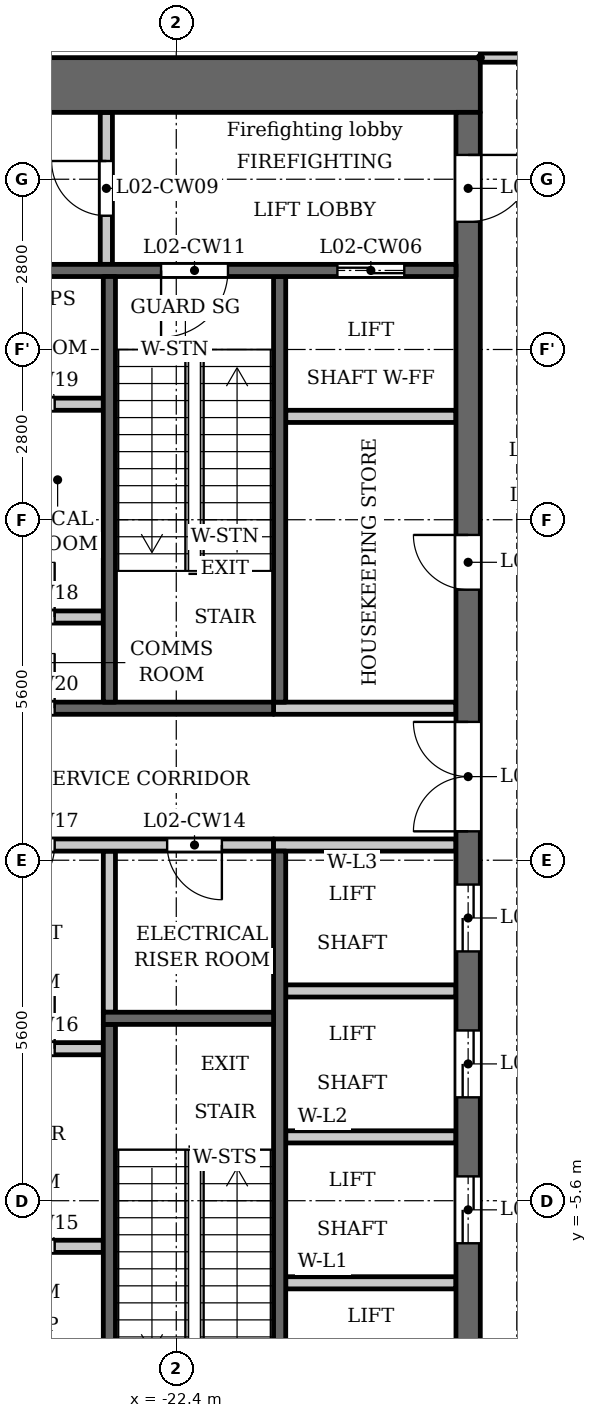
"""IFC4 building model, lengths in metres.
Left out: names, types, materials, properties, quantities, classifications, styles, units other than length and angle.
Written with IfcOpenShell. Run it as: python <this file> out.ifc"""

import sys

from ifc_helpers import new_model, si_unit, direction, frame, frame_2d, origin, place, context, subcontext, project, spatial, rectangle, extrude, element, fill, save


model = new_model("IFC4")
c1 = context("Model", 3, precision=1e-05, world=origin(), true_north=direction((0.0, 1.0)))
c2 = subcontext(c1, "Body", "Model", "MODEL_VIEW")
j1 = project(units=[si_unit("LENGTHUNIT", "METRE"), si_unit("PLANEANGLEUNIT", "RADIAN")], contexts=[c1])
p1 = place(None, origin())
s1 = spatial("IfcSite", under=j1, at=p1, CompositionType="ELEMENT")
p2 = place(p1, origin())
s2 = spatial("IfcBuilding", under=s1, at=p2, CompositionType="ELEMENT")
p3 = place(p2, frame((0.0, 0.0, 11.3)))
s3 = spatial("IfcBuildingStorey", under=s2, at=p3, CompositionType="ELEMENT", Elevation=11.3)
p4 = place(p3, frame((-23.5, -2.5, 0.0), z_axis=(0.0, 0.0, 1.0), x_axis=(0.0, 1.0, 0.0)))
e1 = element("IfcWall", 1, at=p4, inside=s3, PredefinedType="PARTITIONING", context=c2, shape_type="SweptSolid", body=[
    extrude(rectangle(XDim=2.65, YDim=0.2, at=frame_2d((1.325, 0.0))), origin(), (0.0, 0.0, 1.0), 4.45),
])
p5 = place(p3, frame((-20.7, 2.6, 0.0), z_axis=(0.0, 0.0, 1.0), x_axis=(0.0, 1.0, 0.0)))
e2 = element("IfcWall", 2, at=p5, inside=s3, PredefinedType="SHEAR", context=c2, shape_type="SweptSolid", body=[
    extrude(rectangle(XDim=7.0, YDim=0.2, at=frame_2d((3.5, 0.0))), origin(), (0.0, 0.0, 1.0), 4.45),
])
p6 = place(p3, frame((-20.7, -9.6, 0.0), z_axis=(0.0, 0.0, 1.0), x_axis=(0.0, 1.0, 0.0)))
e3 = element("IfcWall", 3, at=p6, inside=s3, PredefinedType="SHEAR", context=c2, shape_type="SweptSolid", body=[
    extrude(rectangle(XDim=9.75, YDim=0.2, at=frame_2d((4.875, 0.0))), origin(), (0.0, 0.0, 1.0), 4.45),
])
p7 = place(p3, frame((-20.8, 2.5, 0.0), z_axis=(0.0, 0.0, 1.0), x_axis=(-1.0, 0.0, 0.0)))
e4 = element("IfcWall", 4, at=p7, inside=s3, PredefinedType="SHEAR", context=c2, shape_type="SweptSolid", body=[
    extrude(rectangle(XDim=5.3, YDim=0.2, at=frame_2d((2.65, 0.0))), origin(), (0.0, 0.0, 1.0), 4.45),
])
p8 = place(p7, frame((3.6, 0.0, 0.0)))
e5 = element("IfcOpeningElement", 5, at=p8, cuts=e4, PredefinedType="OPENING", context=c2, shape_type="SweptSolid", body=[
    extrude(rectangle(XDim=0.9, YDim=2.1, at=frame_2d((0.45, 1.05))), frame((0.0, 0.11, 0.0), z_axis=(0.0, -1.0, 0.0), x_axis=(1.0, 0.0, 0.0)), (0.0, 0.0, 1.0), 0.22),
])
p9 = place(p3, frame((-20.8, 0.25, 0.0), z_axis=(0.0, 0.0, 1.0), x_axis=(-1.0, 0.0, 0.0)))
e6 = element("IfcWall", 6, at=p9, inside=s3, PredefinedType="PARTITIONING", context=c2, shape_type="SweptSolid", body=[
    extrude(rectangle(XDim=5.3, YDim=0.2, at=frame_2d((2.65, 0.0))), origin(), (0.0, 0.0, 1.0), 4.45),
])
p10 = place(p9, frame((0.85, 0.0, 0.0)))
e7 = element("IfcOpeningElement", 7, at=p10, cuts=e6, PredefinedType="OPENING", context=c2, shape_type="SweptSolid", body=[
    extrude(rectangle(XDim=0.9, YDim=2.1, at=frame_2d((0.45, 1.05))), frame((0.0, 0.11, 0.0), z_axis=(0.0, -1.0, 0.0), x_axis=(1.0, 0.0, 0.0)), (0.0, 0.0, 1.0), 0.22),
])
p11 = place(p9, frame((3.6, 0.0, 0.0)))
e8 = element("IfcOpeningElement", 8, at=p11, cuts=e6, PredefinedType="OPENING", context=c2, shape_type="SweptSolid", body=[
    extrude(rectangle(XDim=0.9, YDim=2.1, at=frame_2d((0.45, 1.05))), frame((0.0, 0.11, 0.0), z_axis=(0.0, -1.0, 0.0), x_axis=(1.0, 0.0, 0.0)), (0.0, 0.0, 1.0), 0.22),
])
p12 = place(p3, frame((-17.4, 12.75, 0.0), z_axis=(0.0, 0.0, 1.0), x_axis=(-1.0, 0.0, 0.0)))
e9 = element("IfcWall", 9, at=p12, inside=s3, PredefinedType="SHEAR", context=c2, shape_type="SweptSolid", body=[
    extrude(rectangle(XDim=10.4, YDim=0.9, at=frame_2d((5.2, 0.0))), origin(), (0.0, 0.0, 1.0), 4.45),
])
p13 = place(p3, frame((-17.6, -12.3, 0.0), z_axis=(0.0, 0.0, 1.0), x_axis=(0.0, 1.0, 0.0)))
e10 = element("IfcWall", 10, at=p13, inside=s3, PredefinedType="SHEAR", context=c2, shape_type="SweptSolid", body=[
    extrude(rectangle(XDim=24.6, YDim=0.4, at=frame_2d((12.3, 0.0))), origin(), (0.0, 0.0, 1.0), 4.45),
])
p14 = place(p13, frame((6.0, 0.0, 0.0)))
e11 = element("IfcOpeningElement", 11, at=p14, cuts=e10, PredefinedType="OPENING", context=c2, shape_type="SweptSolid", body=[
    extrude(rectangle(XDim=1.1, YDim=2.1, at=frame_2d((0.55, 1.05))), frame((0.0, 0.21, 0.0), z_axis=(0.0, -1.0, 0.0), x_axis=(1.0, 0.0, 0.0)), (0.0, 0.0, 1.0), 0.42),
])
p15 = place(p13, frame((8.4, 0.0, 0.0)))
e12 = element("IfcOpeningElement", 12, at=p15, cuts=e10, PredefinedType="OPENING", context=c2, shape_type="SweptSolid", body=[
    extrude(rectangle(XDim=1.1, YDim=2.1, at=frame_2d((0.55, 1.05))), frame((0.0, 0.21, 0.0), z_axis=(0.0, -1.0, 0.0), x_axis=(1.0, 0.0, 0.0)), (0.0, 0.0, 1.0), 0.42),
])
p16 = place(p13, frame((10.8, 0.0, 0.0)))
e13 = element("IfcOpeningElement", 13, at=p16, cuts=e10, PredefinedType="OPENING", context=c2, shape_type="SweptSolid", body=[
    extrude(rectangle(XDim=1.1, YDim=2.1, at=frame_2d((0.55, 1.05))), frame((0.0, 0.21, 0.0), z_axis=(0.0, -1.0, 0.0), x_axis=(1.0, 0.0, 0.0)), (0.0, 0.0, 1.0), 0.42),
])
p17 = place(p13, frame((16.75, 0.0, 0.0)))
e14 = element("IfcOpeningElement", 14, at=p17, cuts=e10, PredefinedType="OPENING", context=c2, shape_type="SweptSolid", body=[
    extrude(rectangle(XDim=0.9, YDim=2.1, at=frame_2d((0.45, 1.05))), frame((0.0, 0.21, 0.0), z_axis=(0.0, -1.0, 0.0), x_axis=(1.0, 0.0, 0.0)), (0.0, 0.0, 1.0), 0.42),
])
p18 = place(p13, frame((22.8, 0.0, 0.0)))
e15 = element("IfcOpeningElement", 15, at=p18, cuts=e10, PredefinedType="OPENING", context=c2, shape_type="SweptSolid", body=[
    extrude(rectangle(XDim=1.1, YDim=2.1, at=frame_2d((0.55, 1.05))), frame((0.0, 0.21, 0.0), z_axis=(0.0, -1.0, 0.0), x_axis=(1.0, 0.0, 0.0)), (0.0, 0.0, 1.0), 0.42),
])
p19 = place(p13, frame((0.7, 0.0, 0.0)))
e16 = element("IfcOpeningElement", 16, at=p19, cuts=e10, PredefinedType="OPENING", context=c2, shape_type="SweptSolid", body=[
    extrude(rectangle(XDim=1.1, YDim=2.1, at=frame_2d((0.55, 1.05))), frame((0.0, 0.21, 0.0), z_axis=(0.0, -1.0, 0.0), x_axis=(1.0, 0.0, 0.0)), (0.0, 0.0, 1.0), 0.42),
])
p20 = place(p13, frame((12.775, 0.0, 0.0)))
e17 = element("IfcOpeningElement", 17, at=p20, cuts=e10, PredefinedType="OPENING", context=c2, shape_type="SweptSolid", body=[
    extrude(rectangle(XDim=1.8, YDim=2.1, at=frame_2d((0.9, 1.05))), frame((0.0, 0.21, 0.0), z_axis=(0.0, -1.0, 0.0), x_axis=(1.0, 0.0, 0.0)), (0.0, 0.0, 1.0), 0.42),
])
p21 = place(p3, frame((-23.55, 9.8, 0.0), z_axis=(0.0, 0.0, 1.0), x_axis=(0.0, 1.0, 0.0)))
e18 = element("IfcWall", 18, at=p21, inside=s3, PredefinedType="PARTITIONING", context=c2, shape_type="SweptSolid", body=[
    extrude(rectangle(XDim=2.5, YDim=0.2, at=frame_2d((1.25, 0.0))), origin(), (0.0, 0.0, 1.0), 4.45),
])
p22 = place(p21, frame((0.8, 0.0, 0.0)))
e19 = element("IfcOpeningElement", 19, at=p22, cuts=e18, PredefinedType="OPENING", context=c2, shape_type="SweptSolid", body=[
    extrude(rectangle(XDim=0.9, YDim=2.1, at=frame_2d((0.45, 1.05))), frame((0.0, 0.11, 0.0), z_axis=(0.0, -1.0, 0.0), x_axis=(1.0, 0.0, 0.0)), (0.0, 0.0, 1.0), 0.22),
])
p23 = place(p3, frame((-23.6, -6.35, 0.0), z_axis=(0.0, 0.0, 1.0), x_axis=(-1.0, 0.0, 0.0)))
e20 = element("IfcWall", 20, at=p23, inside=s3, PredefinedType="PARTITIONING", context=c2, shape_type="SweptSolid", body=[
    extrude(rectangle(XDim=2.5, YDim=0.2, at=frame_2d((1.25, 0.0))), origin(), (0.0, 0.0, 1.0), 4.45),
])
p24 = place(p23, frame((0.8, 0.0, 0.0)))
e21 = element("IfcOpeningElement", 21, at=p24, cuts=e20, PredefinedType="OPENING", context=c2, shape_type="SweptSolid", body=[
    extrude(rectangle(XDim=0.9, YDim=2.1, at=frame_2d((0.45, 1.05))), frame((0.0, 0.11, 0.0), z_axis=(0.0, -1.0, 0.0), x_axis=(1.0, 0.0, 0.0)), (0.0, 0.0, 1.0), 0.22),
])
p25 = place(p3, frame((-23.6, -3.1, 0.0), z_axis=(0.0, 0.0, 1.0), x_axis=(-1.0, 0.0, 0.0)))
e22 = element("IfcWall", 22, at=p25, inside=s3, PredefinedType="PARTITIONING", context=c2, shape_type="SweptSolid", body=[
    extrude(rectangle(XDim=2.5, YDim=0.2, at=frame_2d((1.25, 0.0))), origin(), (0.0, 0.0, 1.0), 4.45),
])
p26 = place(p25, frame((0.8, 0.0, 0.0)))
e23 = element("IfcOpeningElement", 23, at=p26, cuts=e22, PredefinedType="OPENING", context=c2, shape_type="SweptSolid", body=[
    extrude(rectangle(XDim=0.9, YDim=2.1, at=frame_2d((0.45, 1.05))), frame((0.0, 0.11, 0.0), z_axis=(0.0, -1.0, 0.0), x_axis=(1.0, 0.0, 0.0)), (0.0, 0.0, 1.0), 0.22),
])
p27 = place(p3, frame((-23.6, 4.0, 0.0), z_axis=(0.0, 0.0, 1.0), x_axis=(-1.0, 0.0, 0.0)))
e24 = element("IfcWall", 24, at=p27, inside=s3, PredefinedType="PARTITIONING", context=c2, shape_type="SweptSolid", body=[
    extrude(rectangle(XDim=2.5, YDim=0.2, at=frame_2d((1.25, 0.0))), origin(), (0.0, 0.0, 1.0), 4.45),
])
p28 = place(p27, frame((0.8, 0.0, 0.0)))
e25 = element("IfcOpeningElement", 25, at=p28, cuts=e24, PredefinedType="OPENING", context=c2, shape_type="SweptSolid", body=[
    extrude(rectangle(XDim=0.9, YDim=2.1, at=frame_2d((0.45, 1.05))), frame((0.0, 0.11, 0.0), z_axis=(0.0, -1.0, 0.0), x_axis=(1.0, 0.0, 0.0)), (0.0, 0.0, 1.0), 0.22),
])
p29 = place(p3, frame((-23.6, 7.5, 0.0), z_axis=(0.0, 0.0, 1.0), x_axis=(-1.0, 0.0, 0.0)))
e26 = element("IfcWall", 26, at=p29, inside=s3, PredefinedType="PARTITIONING", context=c2, shape_type="SweptSolid", body=[
    extrude(rectangle(XDim=2.5, YDim=0.2, at=frame_2d((1.25, 0.0))), origin(), (0.0, 0.0, 1.0), 4.45),
])
p30 = place(p29, frame((0.8, 0.0, 0.0)))
e27 = element("IfcOpeningElement", 27, at=p30, cuts=e26, PredefinedType="OPENING", context=c2, shape_type="SweptSolid", body=[
    extrude(rectangle(XDim=0.9, YDim=2.1, at=frame_2d((0.45, 1.05))), frame((0.0, 0.11, 0.0), z_axis=(0.0, -1.0, 0.0), x_axis=(1.0, 0.0, 0.0)), (0.0, 0.0, 1.0), 0.22),
])
for number, where, z_axis, x_axis in (
    (28, (-17.8, -6.95, 0.0), (0.0, 0.0, 1.0), (-1.0, 0.0, 0.0)),
    (29, (-17.8, -4.55, 0.0), (0.0, 0.0, 1.0), (-1.0, 0.0, 0.0)),
    (30, (-17.8, -2.15, 0.0), (0.0, 0.0, 1.0), (-1.0, 0.0, 0.0)),
):
    element("IfcWall", number, at=place(p3, frame(where, z_axis=z_axis, x_axis=x_axis)), inside=s3, PredefinedType="PARTITIONING", context=c2, shape_type="SweptSolid", body=[
        extrude(rectangle(XDim=2.8, YDim=0.2, at=frame_2d((1.4, 0.0))), origin(), (0.0, 0.0, 1.0), 4.45),
    ])
for number, where, z_axis, x_axis in (
    (31, (-17.8, 0.25, 0.0), (0.0, 0.0, 1.0), (-1.0, 0.0, 0.0)),
    (32, (-17.8, 2.5, 0.0), (0.0, 0.0, 1.0), (-1.0, 0.0, 0.0)),
):
    element("IfcWall", number, at=place(p3, frame(where, z_axis=z_axis, x_axis=x_axis)), inside=s3, PredefinedType="PARTITIONING", context=c2, shape_type="SweptSolid", body=[
        extrude(rectangle(XDim=3.0, YDim=0.2, at=frame_2d((1.5, 0.0))), origin(), (0.0, 0.0, 1.0), 4.45),
    ])
p31 = place(p3, frame((-17.8, 7.3, 0.0), z_axis=(0.0, 0.0, 1.0), x_axis=(-1.0, 0.0, 0.0)))
e33 = element("IfcWall", 33, at=p31, inside=s3, PredefinedType="PARTITIONING", context=c2, shape_type="SweptSolid", body=[
    extrude(rectangle(XDim=2.8, YDim=0.2, at=frame_2d((1.4, 0.0))), origin(), (0.0, 0.0, 1.0), 4.45),
])
p32 = place(p3, frame((-17.8, 9.7, 0.0), z_axis=(0.0, 0.0, 1.0), x_axis=(-1.0, 0.0, 0.0)))
e34 = element("IfcWall", 34, at=p32, inside=s3, PredefinedType="SHEAR", context=c2, shape_type="SweptSolid", body=[
    extrude(rectangle(XDim=8.3, YDim=0.2, at=frame_2d((4.15, 0.0))), origin(), (0.0, 0.0, 1.0), 4.45),
])
p33 = place(p32, frame((0.85, 0.0, 0.0)))
e35 = element("IfcOpeningElement", 35, at=p33, cuts=e34, PredefinedType="OPENING", context=c2, shape_type="SweptSolid", body=[
    extrude(rectangle(XDim=1.1, YDim=2.1, at=frame_2d((0.55, 1.05))), frame((0.0, 0.11, 0.0), z_axis=(0.0, -1.0, 0.0), x_axis=(1.0, 0.0, 0.0)), (0.0, 0.0, 1.0), 0.22),
])
p34 = place(p32, frame((3.75, 0.0, 0.0)))
e36 = element("IfcOpeningElement", 36, at=p34, cuts=e34, PredefinedType="OPENING", context=c2, shape_type="SweptSolid", body=[
    extrude(rectangle(XDim=1.1, YDim=2.1, at=frame_2d((0.55, 1.05))), frame((0.0, 0.11, 0.0), z_axis=(0.0, -1.0, 0.0), x_axis=(1.0, 0.0, 0.0)), (0.0, 0.0, 1.0), 0.22),
])
p35 = place(p3, frame((-23.5, 2.6, 0.0), z_axis=(0.0, 0.0, 1.0), x_axis=(0.0, 1.0, 0.0)))
e37 = element("IfcWall", 37, at=p35, inside=s3, PredefinedType="SHEAR", context=c2, shape_type="SweptSolid", body=[
    extrude(rectangle(XDim=7.0, YDim=0.2, at=frame_2d((3.5, 0.0))), origin(), (0.0, 0.0, 1.0), 4.45),
])
p36 = place(p3, frame((-23.5, -9.6, 0.0), z_axis=(0.0, 0.0, 1.0), x_axis=(0.0, 1.0, 0.0)))
e38 = element("IfcWall", 38, at=p36, inside=s3, PredefinedType="SHEAR", context=c2, shape_type="SweptSolid", body=[
    extrude(rectangle(XDim=6.9, YDim=0.2, at=frame_2d((3.45, 0.0))), origin(), (0.0, 0.0, 1.0), 4.45),
])
p37 = place(p3, frame((-20.8, -2.6, 0.0), z_axis=(0.0, 0.0, 1.0), x_axis=(-1.0, 0.0, 0.0)))
e39 = element("IfcWall", 39, at=p37, inside=s3, PredefinedType="SHEAR", context=c2, shape_type="SweptSolid", body=[
    extrude(rectangle(XDim=2.8, YDim=0.2, at=frame_2d((1.4, 0.0))), origin(), (0.0, 0.0, 1.0), 4.45),
])
p38 = place(p3, frame((-17.4, 13.2, 0.0), z_axis=(0.0, 0.0, 1.0), x_axis=(1.0, 0.0, 0.0)))
e40 = element("IfcWall", 40, at=p38, inside=s3, PredefinedType="PARTITIONING", context=c2, shape_type="SweptSolid", body=[
    extrude(rectangle(XDim=34.8, YDim=0.15, at=frame_2d((17.4, 0.0))), origin(), (0.0, 0.0, 1.0), 4.45),
])
p39 = place(p38, frame((3.05, 0.0, 0.0)))
e41 = element("IfcOpeningElement", 41, at=p39, cuts=e40, PredefinedType="OPENING", context=c2, shape_type="SweptSolid", body=[
    extrude(rectangle(XDim=1.8, YDim=2.1, at=frame_2d((0.9, 1.05))), frame((0.0, 0.085, 0.0), z_axis=(0.0, -1.0, 0.0), x_axis=(1.0, 0.0, 0.0)), (0.0, 0.0, 1.0), 0.17),
])
p40 = place(p38, frame((0.75, 0.0, 0.0)))
e42 = element("IfcOpeningElement", 42, at=p40, cuts=e40, PredefinedType="OPENING", context=c2, shape_type="SweptSolid", body=[
    extrude(rectangle(XDim=1.0, YDim=2.1, at=frame_2d((0.5, 1.05))), frame((0.0, 0.085, 0.0), z_axis=(0.0, -1.0, 0.0), x_axis=(1.0, 0.0, 0.0)), (0.0, 0.0, 1.0), 0.17),
])
p41 = place(p38, frame((33.15, 0.0, 0.0)))
e43 = element("IfcOpeningElement", 43, at=p41, cuts=e40, PredefinedType="OPENING", context=c2, shape_type="SweptSolid", body=[
    extrude(rectangle(XDim=1.0, YDim=2.1, at=frame_2d((0.5, 1.05))), frame((0.0, 0.085, 0.0), z_axis=(0.0, -1.0, 0.0), x_axis=(1.0, 0.0, 0.0)), (0.0, 0.0, 1.0), 0.17),
])
p42 = place(p14, origin())
e44 = element("IfcDoor", 44, at=p42, inside=s3, OperationType="DOUBLE_DOOR_SLIDING", PredefinedType="DOOR", context=c2, shape_type="SweptSolid", body=[
    extrude(rectangle(XDim=1.1, YDim=2.1, at=frame_2d((0.55, 1.05))), frame((0.0, 0.025, 0.0), z_axis=(0.0, -1.0, 0.0), x_axis=(1.0, 0.0, 0.0)), (0.0, 0.0, 1.0), 0.05),
])
fill(e11, e44)
p43 = place(p15, origin())
e45 = element("IfcDoor", 45, at=p43, inside=s3, OperationType="DOUBLE_DOOR_SLIDING", PredefinedType="DOOR", context=c2, shape_type="SweptSolid", body=[
    extrude(rectangle(XDim=1.1, YDim=2.1, at=frame_2d((0.55, 1.05))), frame((0.0, 0.025, 0.0), z_axis=(0.0, -1.0, 0.0), x_axis=(1.0, 0.0, 0.0)), (0.0, 0.0, 1.0), 0.05),
])
fill(e12, e45)
p44 = place(p16, origin())
e46 = element("IfcDoor", 46, at=p44, inside=s3, OperationType="DOUBLE_DOOR_SLIDING", PredefinedType="DOOR", context=c2, shape_type="SweptSolid", body=[
    extrude(rectangle(XDim=1.1, YDim=2.1, at=frame_2d((0.55, 1.05))), frame((0.0, 0.025, 0.0), z_axis=(0.0, -1.0, 0.0), x_axis=(1.0, 0.0, 0.0)), (0.0, 0.0, 1.0), 0.05),
])
fill(e13, e46)
p45 = place(p17, origin())
e47 = element("IfcDoor", 47, at=p45, inside=s3, OperationType="SINGLE_SWING_LEFT", PredefinedType="DOOR", context=c2, shape_type="SweptSolid", body=[
    extrude(rectangle(XDim=0.9, YDim=2.1, at=frame_2d((0.45, 1.05))), frame((0.0, 0.025, 0.0), z_axis=(0.0, -1.0, 0.0), x_axis=(1.0, 0.0, 0.0)), (0.0, 0.0, 1.0), 0.05),
])
fill(e14, e47)
p46 = place(p33, origin())
e48 = element("IfcDoor", 48, at=p46, inside=s3, OperationType="DOUBLE_DOOR_SLIDING", PredefinedType="DOOR", context=c2, shape_type="SweptSolid", body=[
    extrude(rectangle(XDim=1.1, YDim=2.1, at=frame_2d((0.55, 1.05))), frame((0.0, 0.025, 0.0), z_axis=(0.0, -1.0, 0.0), x_axis=(1.0, 0.0, 0.0)), (0.0, 0.0, 1.0), 0.05),
])
fill(e35, e48)
p47 = place(p18, origin())
e49 = element("IfcDoor", 49, at=p47, inside=s3, OperationType="SINGLE_SWING_RIGHT", PredefinedType="DOOR", context=c2, shape_type="SweptSolid", body=[
    extrude(rectangle(XDim=1.1, YDim=2.1, at=frame_2d((0.55, 1.05))), frame((0.0, 0.025, 0.0), z_axis=(0.0, -1.0, 0.0), x_axis=(1.0, 0.0, 0.0)), (0.0, 0.0, 1.0), 0.05),
])
fill(e15, e49)
p48 = place(p22, origin())
e50 = element("IfcDoor", 50, at=p48, inside=s3, OperationType="SINGLE_SWING_LEFT", PredefinedType="DOOR", context=c2, shape_type="SweptSolid", body=[
    extrude(rectangle(XDim=0.9, YDim=2.1, at=frame_2d((0.45, 1.05))), frame((0.0, 0.025, 0.0), z_axis=(0.0, -1.0, 0.0), x_axis=(1.0, 0.0, 0.0)), (0.0, 0.0, 1.0), 0.05),
])
fill(e19, e50)
p49 = place(p34, origin())
e51 = element("IfcDoor", 51, at=p49, inside=s3, OperationType="SINGLE_SWING_LEFT", PredefinedType="DOOR", context=c2, shape_type="SweptSolid", body=[
    extrude(rectangle(XDim=1.1, YDim=2.1, at=frame_2d((0.55, 1.05))), frame((0.0, 0.025, 0.0), z_axis=(0.0, -1.0, 0.0), x_axis=(1.0, 0.0, 0.0)), (0.0, 0.0, 1.0), 0.05),
])
fill(e36, e51)
p50 = place(p20, origin())
e52 = element("IfcDoor", 52, at=p50, inside=s3, OperationType="DOUBLE_DOOR_SINGLE_SWING", PredefinedType="DOOR", context=c2, shape_type="SweptSolid", body=[
    extrude(rectangle(XDim=1.8, YDim=2.1, at=frame_2d((0.9, 1.05))), frame((0.0, 0.025, 0.0), z_axis=(0.0, -1.0, 0.0), x_axis=(1.0, 0.0, 0.0)), (0.0, 0.0, 1.0), 0.05),
])
fill(e17, e52)
p51 = place(p10, origin())
e53 = element("IfcDoor", 53, at=p51, inside=s3, OperationType="SINGLE_SWING_RIGHT", PredefinedType="DOOR", context=c2, shape_type="SweptSolid", body=[
    extrude(rectangle(XDim=0.9, YDim=2.1, at=frame_2d((0.45, 1.05))), frame((0.0, 0.025, 0.0), z_axis=(0.0, -1.0, 0.0), x_axis=(1.0, 0.0, 0.0)), (0.0, 0.0, 1.0), 0.05),
])
fill(e7, e53)
p52 = place(p24, origin())
e54 = element("IfcDoor", 54, at=p52, inside=s3, OperationType="SINGLE_SWING_RIGHT", PredefinedType="DOOR", context=c2, shape_type="SweptSolid", body=[
    extrude(rectangle(XDim=0.9, YDim=2.1, at=frame_2d((0.45, 1.05))), frame((0.0, 0.025, 0.0), z_axis=(0.0, -1.0, 0.0), x_axis=(1.0, 0.0, 0.0)), (0.0, 0.0, 1.0), 0.05),
])
fill(e21, e54)
p53 = place(p26, origin())
e55 = element("IfcDoor", 55, at=p53, inside=s3, OperationType="SINGLE_SWING_LEFT", PredefinedType="DOOR", context=c2, shape_type="SweptSolid", body=[
    extrude(rectangle(XDim=0.9, YDim=2.1, at=frame_2d((0.45, 1.05))), frame((0.0, 0.025, 0.0), z_axis=(0.0, -1.0, 0.0), x_axis=(1.0, 0.0, 0.0)), (0.0, 0.0, 1.0), 0.05),
])
fill(e23, e55)
p54 = place(p11, origin())
e56 = element("IfcDoor", 56, at=p54, inside=s3, OperationType="SINGLE_SWING_LEFT", PredefinedType="DOOR", context=c2, shape_type="SweptSolid", body=[
    extrude(rectangle(XDim=0.9, YDim=2.1, at=frame_2d((0.45, 1.05))), frame((0.0, 0.025, 0.0), z_axis=(0.0, -1.0, 0.0), x_axis=(1.0, 0.0, 0.0)), (0.0, 0.0, 1.0), 0.05),
])
fill(e8, e56)
p55 = place(p28, origin())
e57 = element("IfcDoor", 57, at=p55, inside=s3, OperationType="SINGLE_SWING_LEFT", PredefinedType="DOOR", context=c2, shape_type="SweptSolid", body=[
    extrude(rectangle(XDim=0.9, YDim=2.1, at=frame_2d((0.45, 1.05))), frame((0.0, 0.025, 0.0), z_axis=(0.0, -1.0, 0.0), x_axis=(1.0, 0.0, 0.0)), (0.0, 0.0, 1.0), 0.05),
])
fill(e25, e57)
p56 = place(p30, origin())
e58 = element("IfcDoor", 58, at=p56, inside=s3, OperationType="SINGLE_SWING_RIGHT", PredefinedType="DOOR", context=c2, shape_type="SweptSolid", body=[
    extrude(rectangle(XDim=0.9, YDim=2.1, at=frame_2d((0.45, 1.05))), frame((0.0, 0.025, 0.0), z_axis=(0.0, -1.0, 0.0), x_axis=(1.0, 0.0, 0.0)), (0.0, 0.0, 1.0), 0.05),
])
fill(e27, e58)
p57 = place(p8, origin())
e59 = element("IfcDoor", 59, at=p57, inside=s3, OperationType="SINGLE_SWING_LEFT", PredefinedType="DOOR", context=c2, shape_type="SweptSolid", body=[
    extrude(rectangle(XDim=0.9, YDim=2.1, at=frame_2d((0.45, 1.05))), frame((0.0, 0.025, 0.0), z_axis=(0.0, -1.0, 0.0), x_axis=(1.0, 0.0, 0.0)), (0.0, 0.0, 1.0), 0.05),
])
fill(e5, e59)
save(model, sys.argv[1])
